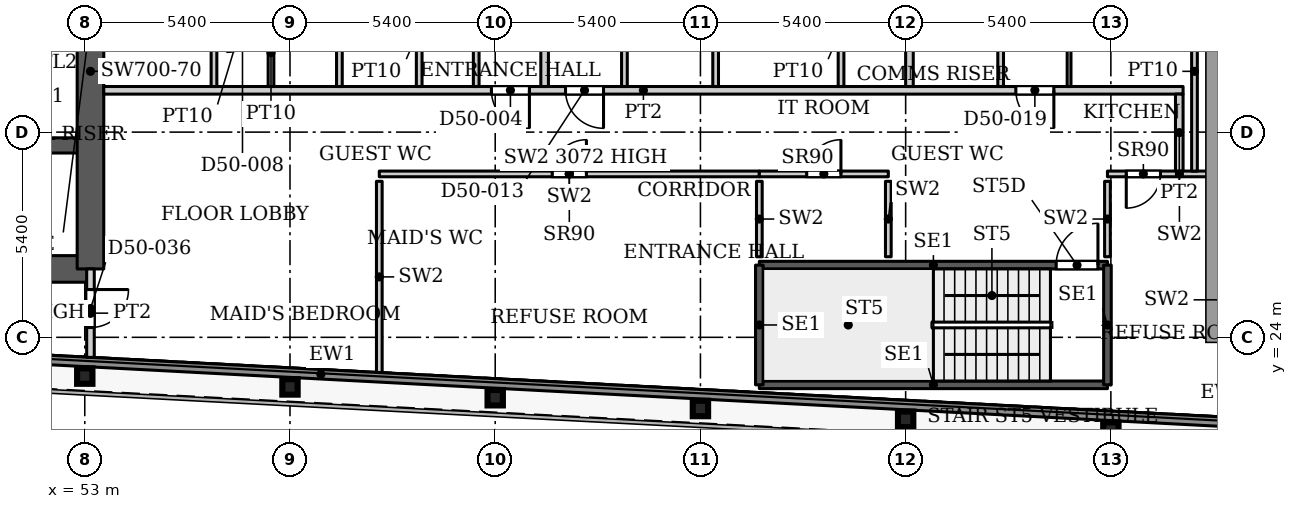
"""IFC4 building model, lengths in metres.
Left out: names, types, materials, properties, quantities, classifications, styles, units other than length and angle.
Written with IfcOpenShell. Run it as: python <this file> out.ifc"""

import sys

from ifc_helpers import new_model, si_unit, direction, frame, frame_2d, origin, origin_2d, place, context, subcontext, project, spatial, rectangle, i_section, extrude, source, transform, mapped, element, fill, save


model = new_model("IFC4")
c1 = context("Model", 3, precision=1e-05, world=origin(), true_north=direction((0.0, 1.0)))
c2 = subcontext(c1, "Body", "Model", "MODEL_VIEW")
j1 = project(units=[si_unit("LENGTHUNIT", "METRE"), si_unit("PLANEANGLEUNIT", "RADIAN")], contexts=[c1])
p1 = place(None, origin())
s1 = spatial("IfcSite", under=j1, at=p1, CompositionType="ELEMENT")
p2 = place(p1, origin())
s2 = spatial("IfcBuilding", under=s1, at=p2, CompositionType="ELEMENT")
p3 = place(p2, frame((0.0, 0.0, 216.2)))
s3 = spatial("IfcBuildingStorey", under=s2, at=p3, CompositionType="ELEMENT", Elevation=216.2)
for number, where, z_axis, x_axis in (
    (1, (80.0, 21.558, 0.0), (0.0, 0.0, 1.0), (1.0, 0.0, 0.0)),
    (2, (74.6, 21.843, 0.0), (0.0, 0.0, 1.0), (1.0, 0.0, 0.0)),
    (3, (69.2, 22.127, 0.0), (0.0, 0.0, 1.0), (1.0, 0.0, 0.0)),
    (4, (63.8, 22.411, 0.0), (0.0, 0.0, 1.0), (1.0, 0.0, 0.0)),
    (5, (58.4, 22.695, 0.0), (0.0, 0.0, 1.0), (1.0, 0.0, 0.0)),
    (6, (53.0, 22.98, 0.0), (0.0, 0.0, 1.0), (1.0, 0.0, 0.0)),
):
    element("IfcColumn", number, at=place(p3, frame(where, z_axis=z_axis, x_axis=x_axis)), inside=s3, PredefinedType="COLUMN", context=c2, shape_type="SweptSolid", body=[
        extrude(i_section(OverallWidth=0.404, OverallDepth=0.407, WebThickness=0.027, FlangeThickness=0.044, FilletRadius=0.012, at=origin_2d()), origin(), (0.0, 0.0, 1.0), 3.9),
    ])
p4 = place(p3, frame((34.75, 25.8, 0.0), z_axis=(0.0, 0.0, 1.0), x_axis=(1.0, 0.0, 0.0)))
e7 = element("IfcWall", 7, at=p4, inside=s3, PredefinedType="SHEAR", context=c2, shape_type="SweptSolid", body=[
    extrude(rectangle(XDim=18.4, YDim=0.7, at=frame_2d((9.2, 0.0))), origin(), (0.0, 0.0, 1.0), 3.9),
])
p5 = place(p3, frame((34.75, 29.05, 0.0), z_axis=(0.0, 0.0, 1.0), x_axis=(1.0, 0.0, 0.0)))
e8 = element("IfcWall", 8, at=p5, inside=s3, PredefinedType="SHEAR", context=c2, shape_type="SweptSolid", body=[
    extrude(rectangle(XDim=18.4, YDim=0.4, at=frame_2d((9.2, 0.0))), origin(), (0.0, 0.0, 1.0), 3.9),
])
p6 = place(p5, frame((0.875, 0.0, 0.0)))
e9 = element("IfcOpeningElement", 9, at=p6, cuts=e8, PredefinedType="OPENING", context=c2, shape_type="SweptSolid", body=[
    extrude(rectangle(XDim=1.1, YDim=2.2, at=frame_2d((0.55, 1.1))), frame((0.0, 0.21, 0.0), z_axis=(0.0, -1.0, 0.0), x_axis=(1.0, 0.0, 0.0)), (0.0, 0.0, 1.0), 0.42),
])
p7 = place(p5, frame((3.725, 0.0, 0.0)))
e10 = element("IfcOpeningElement", 10, at=p7, cuts=e8, PredefinedType="OPENING", context=c2, shape_type="SweptSolid", body=[
    extrude(rectangle(XDim=1.1, YDim=2.2, at=frame_2d((0.55, 1.1))), frame((0.0, 0.21, 0.0), z_axis=(0.0, -1.0, 0.0), x_axis=(1.0, 0.0, 0.0)), (0.0, 0.0, 1.0), 0.42),
])
p8 = place(p5, frame((6.575, 0.0, 0.0)))
e11 = element("IfcOpeningElement", 11, at=p8, cuts=e8, PredefinedType="OPENING", context=c2, shape_type="SweptSolid", body=[
    extrude(rectangle(XDim=1.1, YDim=2.2, at=frame_2d((0.55, 1.1))), frame((0.0, 0.21, 0.0), z_axis=(0.0, -1.0, 0.0), x_axis=(1.0, 0.0, 0.0)), (0.0, 0.0, 1.0), 0.42),
])
p9 = place(p5, frame((9.425, 0.0, 0.0)))
e12 = element("IfcOpeningElement", 12, at=p9, cuts=e8, PredefinedType="OPENING", context=c2, shape_type="SweptSolid", body=[
    extrude(rectangle(XDim=1.1, YDim=2.2, at=frame_2d((0.55, 1.1))), frame((0.0, 0.21, 0.0), z_axis=(0.0, -1.0, 0.0), x_axis=(1.0, 0.0, 0.0)), (0.0, 0.0, 1.0), 0.42),
])
p10 = place(p5, frame((12.275, 0.0, 0.0)))
e13 = element("IfcOpeningElement", 13, at=p10, cuts=e8, PredefinedType="OPENING", context=c2, shape_type="SweptSolid", body=[
    extrude(rectangle(XDim=1.1, YDim=2.2, at=frame_2d((0.55, 1.1))), frame((0.0, 0.21, 0.0), z_axis=(0.0, -1.0, 0.0), x_axis=(1.0, 0.0, 0.0)), (0.0, 0.0, 1.0), 0.42),
])
p11 = place(p5, frame((15.125, 0.0, 0.0)))
e14 = element("IfcOpeningElement", 14, at=p11, cuts=e8, PredefinedType="OPENING", context=c2, shape_type="SweptSolid", body=[
    extrude(rectangle(XDim=1.1, YDim=2.2, at=frame_2d((0.55, 1.1))), frame((0.0, 0.21, 0.0), z_axis=(0.0, -1.0, 0.0), x_axis=(1.0, 0.0, 0.0)), (0.0, 0.0, 1.0), 0.42),
])
p12 = place(p3, frame((53.15, 25.8, 0.0), z_axis=(0.0, 0.0, 1.0), x_axis=(0.0, 1.0, 0.0)))
e15 = element("IfcWall", 15, at=p12, inside=s3, PredefinedType="SHEAR", context=c2, shape_type="SweptSolid", body=[
    extrude(rectangle(XDim=10.4, YDim=0.7, at=frame_2d((5.2, 0.0))), origin(), (0.0, 0.0, 1.0), 3.9),
])
p13 = place(p3, frame((84.386, 21.703, 0.0), z_axis=(0.0, 0.0, 1.0), x_axis=(-0.998617508267, 0.05256493302, 0.0)))
e16 = element("IfcWall", 16, at=p13, inside=s3, PredefinedType="SOLIDWALL", context=c2, shape_type="SweptSolid", body=[
    extrude(rectangle(XDim=50.417, YDim=0.25, at=frame_2d((25.208, 0.0))), origin(), (0.0, 0.0, 1.0), 3.75),
])
p14 = place(p3, frame((70.75, 22.75, 0.0), z_axis=(0.0, 0.0, 1.0), x_axis=(1.0, 0.0, 0.0)))
e17 = element("IfcWall", 17, at=p14, inside=s3, PredefinedType="SHEAR", context=c2, shape_type="SweptSolid", body=[
    extrude(rectangle(XDim=9.16, YDim=0.2, at=frame_2d((4.58, 0.0))), origin(), (0.0, 0.0, 1.0), 3.9),
])
p15 = place(p3, frame((70.75, 25.9, 0.0), z_axis=(0.0, 0.0, 1.0), x_axis=(1.0, 0.0, 0.0)))
e18 = element("IfcWall", 18, at=p15, inside=s3, PredefinedType="SHEAR", context=c2, shape_type="SweptSolid", body=[
    extrude(rectangle(XDim=9.16, YDim=0.2, at=frame_2d((4.58, 0.0))), origin(), (0.0, 0.0, 1.0), 3.9),
])
p16 = place(p15, frame((7.81, 0.0, 0.0)))
e19 = element("IfcOpeningElement", 19, at=p16, cuts=e18, PredefinedType="OPENING", context=c2, shape_type="SweptSolid", body=[
    extrude(rectangle(XDim=1.1, YDim=2.2, at=frame_2d((0.55, 1.1))), frame((0.0, 0.11, 0.0), z_axis=(0.0, -1.0, 0.0), x_axis=(1.0, 0.0, 0.0)), (0.0, 0.0, 1.0), 0.22),
])
for number, where, z_axis, x_axis in (
    (20, (70.75, 22.75, 0.0), (0.0, 0.0, 1.0), (0.0, 1.0, 0.0)),
    (21, (79.91, 22.75, 0.0), (0.0, 0.0, 1.0), (0.0, 1.0, 0.0)),
):
    element("IfcWall", number, at=place(p3, frame(where, z_axis=z_axis, x_axis=x_axis)), inside=s3, PredefinedType="SHEAR", context=c2, shape_type="SweptSolid", body=[
        extrude(rectangle(XDim=3.15, YDim=0.2, at=frame_2d((1.575, 0.0))), origin(), (0.0, 0.0, 1.0), 3.9),
    ])
p17 = place(p3, frame((60.75, 28.3, 0.0), z_axis=(0.0, 0.0, 1.0), x_axis=(1.0, 0.0, 0.0)))
e22 = element("IfcWall", 22, at=p17, inside=s3, PredefinedType="PARTITIONING", context=c2, shape_type="SweptSolid", body=[
    extrude(rectangle(XDim=10.0, YDim=0.15, at=frame_2d((5.0, 0.0))), origin(), (0.0, 0.0, 1.0), 3.072),
])
p18 = place(p17, frame((4.55, 0.0, 0.0)))
e23 = element("IfcOpeningElement", 23, at=p18, cuts=e22, PredefinedType="OPENING", context=c2, shape_type="SweptSolid", body=[
    extrude(rectangle(XDim=0.9, YDim=2.2, at=frame_2d((0.45, 1.1))), frame((0.0, 0.085, 0.0), z_axis=(0.0, -1.0, 0.0), x_axis=(1.0, 0.0, 0.0)), (0.0, 0.0, 1.0), 0.17),
])
p19 = place(p3, frame((60.75, 23.075, 0.0), z_axis=(0.0, 0.0, 1.0), x_axis=(0.0, 1.0, 0.0)))
e24 = element("IfcWall", 24, at=p19, inside=s3, PredefinedType="PARTITIONING", context=c2, shape_type="SweptSolid", body=[
    extrude(rectangle(XDim=5.03, YDim=0.15, at=frame_2d((2.515, 0.0))), origin(), (0.0, 0.0, 1.0), 3.9),
])
p20 = place(p3, frame((70.75, 26.12, 0.0), z_axis=(0.0, 0.0, 1.0), x_axis=(0.0, 1.0, 0.0)))
e25 = element("IfcWall", 25, at=p20, inside=s3, PredefinedType="PARTITIONING", context=c2, shape_type="SweptSolid", body=[
    extrude(rectangle(XDim=1.985, YDim=0.15, at=frame_2d((0.992, 0.0))), origin(), (0.0, 0.0, 1.0), 3.9),
])
p21 = place(p3, frame((70.75, 28.3, 0.0), z_axis=(0.0, 0.0, 1.0), x_axis=(1.0, 0.0, 0.0)))
e26 = element("IfcWall", 26, at=p21, inside=s3, PredefinedType="PARTITIONING", context=c2, shape_type="SweptSolid", body=[
    extrude(rectangle(XDim=3.394, YDim=0.15, at=frame_2d((1.697, 0.0))), origin(), (0.0, 0.0, 1.0), 3.9),
])
p22 = place(p21, frame((1.247, 0.0, 0.0)))
e27 = element("IfcOpeningElement", 27, at=p22, cuts=e26, PredefinedType="OPENING", context=c2, shape_type="SweptSolid", body=[
    extrude(rectangle(XDim=0.9, YDim=2.2, at=frame_2d((0.45, 1.1))), frame((0.0, 0.085, 0.0), z_axis=(0.0, -1.0, 0.0), x_axis=(1.0, 0.0, 0.0)), (0.0, 0.0, 1.0), 0.17),
])
p23 = place(p3, frame((74.144, 26.12, 0.0), z_axis=(0.0, 0.0, 1.0), x_axis=(0.0, 1.0, 0.0)))
e28 = element("IfcWall", 28, at=p23, inside=s3, PredefinedType="PARTITIONING", context=c2, shape_type="SweptSolid", body=[
    extrude(rectangle(XDim=1.985, YDim=0.15, at=frame_2d((0.992, 0.0))), origin(), (0.0, 0.0, 1.0), 3.9),
])
p24 = place(p3, frame((79.91, 28.3, 0.0), z_axis=(0.0, 0.0, 1.0), x_axis=(1.0, 0.0, 0.0)))
e29 = element("IfcWall", 29, at=p24, inside=s3, PredefinedType="PARTITIONING", context=c2, shape_type="SweptSolid", body=[
    extrude(rectangle(XDim=3.788, YDim=0.15, at=frame_2d((1.894, 0.0))), origin(), (0.0, 0.0, 1.0), 3.9),
])
p25 = place(p24, frame((0.495, 0.0, 0.0)))
e30 = element("IfcOpeningElement", 30, at=p25, cuts=e29, PredefinedType="OPENING", context=c2, shape_type="SweptSolid", body=[
    extrude(rectangle(XDim=0.9, YDim=2.2, at=frame_2d((0.45, 1.1))), frame((0.0, 0.085, 0.0), z_axis=(0.0, -1.0, 0.0), x_axis=(1.0, 0.0, 0.0)), (0.0, 0.0, 1.0), 0.17),
])
p26 = place(p3, frame((79.91, 26.12, 0.0), z_axis=(0.0, 0.0, 1.0), x_axis=(0.0, 1.0, 0.0)))
e31 = element("IfcWall", 31, at=p26, inside=s3, PredefinedType="PARTITIONING", context=c2, shape_type="SweptSolid", body=[
    extrude(rectangle(XDim=1.985, YDim=0.15, at=frame_2d((0.992, 0.0))), origin(), (0.0, 0.0, 1.0), 3.9),
])
p27 = place(p3, frame((53.15, 23.472, 0.0), z_axis=(0.0, 0.0, 1.0), x_axis=(0.0, 1.0, 0.0)))
e32 = element("IfcWall", 32, at=p27, inside=s3, PredefinedType="PARTITIONING", context=c2, shape_type="SweptSolid", body=[
    extrude(rectangle(XDim=2.328, YDim=0.2, at=frame_2d((1.164, 0.0))), origin(), (0.0, 0.0, 1.0), 3.447),
])
p28 = place(p27, frame((0.785, 0.0, 0.0)))
e33 = element("IfcOpeningElement", 33, at=p28, cuts=e32, PredefinedType="OPENING", context=c2, shape_type="SweptSolid", body=[
    extrude(rectangle(XDim=1.0, YDim=2.1, at=frame_2d((0.5, 1.05))), frame((0.0, 0.11, 0.0), z_axis=(0.0, -1.0, 0.0), x_axis=(1.0, 0.0, 0.0)), (0.0, 0.0, 1.0), 0.22),
])
p29 = place(p3, frame((53.499, 30.5, 0.0), z_axis=(0.0, 0.0, 1.0), x_axis=(1.0, 0.0, 0.0)))
e34 = element("IfcWall", 34, at=p29, inside=s3, PredefinedType="PARTITIONING", context=c2, shape_type="SweptSolid", body=[
    extrude(rectangle(XDim=28.401, YDim=0.2, at=frame_2d((14.2, 0.0))), origin(), (0.0, 0.0, 1.0), 3.6),
])
p30 = place(p29, frame((10.201, 0.0, 0.0)))
e35 = element("IfcOpeningElement", 35, at=p30, cuts=e34, PredefinedType="OPENING", context=c2, shape_type="SweptSolid", body=[
    extrude(rectangle(XDim=1.0, YDim=2.1, at=frame_2d((0.5, 1.05))), frame((0.0, 0.11, 0.0), z_axis=(0.0, -1.0, 0.0), x_axis=(1.0, 0.0, 0.0)), (0.0, 0.0, 1.0), 0.22),
])
p31 = place(p29, frame((12.151, 0.0, 0.0)))
e36 = element("IfcOpeningElement", 36, at=p31, cuts=e34, PredefinedType="OPENING", context=c2, shape_type="SweptSolid", body=[
    extrude(rectangle(XDim=1.0, YDim=2.1, at=frame_2d((0.5, 1.05))), frame((0.0, 0.11, 0.0), z_axis=(0.0, -1.0, 0.0), x_axis=(1.0, 0.0, 0.0)), (0.0, 0.0, 1.0), 0.22),
])
p32 = place(p29, frame((24.001, 0.0, 0.0)))
e37 = element("IfcOpeningElement", 37, at=p32, cuts=e34, PredefinedType="OPENING", context=c2, shape_type="SweptSolid", body=[
    extrude(rectangle(XDim=1.0, YDim=2.1, at=frame_2d((0.5, 1.05))), frame((0.0, 0.11, 0.0), z_axis=(0.0, -1.0, 0.0), x_axis=(1.0, 0.0, 0.0)), (0.0, 0.0, 1.0), 0.22),
])
p33 = place(p3, frame((56.4, 30.6, 0.0), z_axis=(0.0, 0.0, 1.0), x_axis=(0.0, 1.0, 0.0)))
e38 = element("IfcWall", 38, at=p33, inside=s3, PredefinedType="PARTITIONING", context=c2, shape_type="SweptSolid", body=[
    extrude(rectangle(XDim=3.025, YDim=0.15, at=frame_2d((1.512, 0.0))), origin(), (0.0, 0.0, 1.0), 3.6),
])
p34 = place(p3, frame((57.9, 30.6, 0.0), z_axis=(0.0, 0.0, 1.0), x_axis=(0.0, 1.0, 0.0)))
e39 = element("IfcWall", 39, at=p34, inside=s3, PredefinedType="PARTITIONING", context=c2, shape_type="SweptSolid", body=[
    extrude(rectangle(XDim=1.775, YDim=0.15, at=frame_2d((0.887, 0.0))), origin(), (0.0, 0.0, 1.0), 3.6),
])
for number, where, z_axis, x_axis in (
    (40, (59.7, 30.6, 0.0), (0.0, 0.0, 1.0), (0.0, 1.0, 0.0)),
    (41, (61.8, 30.6, 0.0), (0.0, 0.0, 1.0), (0.0, 1.0, 0.0)),
    (42, (63.3, 30.6, 0.0), (0.0, 0.0, 1.0), (0.0, 1.0, 0.0)),
):
    element("IfcWall", number, at=place(p3, frame(where, z_axis=z_axis, x_axis=x_axis)), inside=s3, PredefinedType="PARTITIONING", context=c2, shape_type="SweptSolid", body=[
        extrude(rectangle(XDim=3.025, YDim=0.15, at=frame_2d((1.512, 0.0))), origin(), (0.0, 0.0, 1.0), 3.6),
    ])
p35 = place(p3, frame((65.1, 30.6, 0.0), z_axis=(0.0, 0.0, 1.0), x_axis=(0.0, 1.0, 0.0)))
e43 = element("IfcWall", 43, at=p35, inside=s3, PredefinedType="PARTITIONING", context=c2, shape_type="SweptSolid", body=[
    extrude(rectangle(XDim=13.3, YDim=0.2, at=frame_2d((6.65, 0.0))), origin(), (0.0, 0.0, 1.0), 3.6),
])
for number, where, z_axis, x_axis in (
    (44, (67.2, 30.6, 0.0), (0.0, 0.0, 1.0), (0.0, 1.0, 0.0)),
    (45, (69.6, 30.6, 0.0), (0.0, 0.0, 1.0), (0.0, 1.0, 0.0)),
    (46, (72.9, 30.6, 0.0), (0.0, 0.0, 1.0), (0.0, 1.0, 0.0)),
):
    element("IfcWall", number, at=place(p3, frame(where, z_axis=z_axis, x_axis=x_axis)), inside=s3, PredefinedType="PARTITIONING", context=c2, shape_type="SweptSolid", body=[
        extrude(rectangle(XDim=3.025, YDim=0.15, at=frame_2d((1.512, 0.0))), origin(), (0.0, 0.0, 1.0), 3.6),
    ])
p36 = place(p3, frame((74.7, 30.6, 0.0), z_axis=(0.0, 0.0, 1.0), x_axis=(0.0, 1.0, 0.0)))
e47 = element("IfcWall", 47, at=p36, inside=s3, PredefinedType="PARTITIONING", context=c2, shape_type="SweptSolid", body=[
    extrude(rectangle(XDim=13.3, YDim=0.2, at=frame_2d((6.65, 0.0))), origin(), (0.0, 0.0, 1.0), 3.6),
])
p37 = place(p3, frame((77.1, 30.6, 0.0), z_axis=(0.0, 0.0, 1.0), x_axis=(0.0, 1.0, 0.0)))
e48 = element("IfcWall", 48, at=p37, inside=s3, PredefinedType="PARTITIONING", context=c2, shape_type="SweptSolid", body=[
    extrude(rectangle(XDim=3.175, YDim=0.15, at=frame_2d((1.587, 0.0))), origin(), (0.0, 0.0, 1.0), 3.6),
])
p38 = place(p3, frame((78.9, 30.6, 0.0), z_axis=(0.0, 0.0, 1.0), x_axis=(0.0, 1.0, 0.0)))
e49 = element("IfcWall", 49, at=p38, inside=s3, PredefinedType="PARTITIONING", context=c2, shape_type="SweptSolid", body=[
    extrude(rectangle(XDim=3.025, YDim=0.1, at=frame_2d((1.512, 0.0))), origin(), (0.0, 0.0, 1.0), 3.6),
])
p39 = place(p3, frame((81.8, 28.374, 0.0), z_axis=(0.0, 0.0, 1.0), x_axis=(0.0, 1.0, 0.0)))
e50 = element("IfcWall", 50, at=p39, inside=s3, PredefinedType="PARTITIONING", context=c2, shape_type="SweptSolid", body=[
    extrude(rectangle(XDim=2.026, YDim=0.2, at=frame_2d((1.013, 0.0))), origin(), (0.0, 0.0, 1.0), 3.6),
])
p40 = place(p3, frame((82.2, 28.374, 0.0), z_axis=(0.0, 0.0, 1.0), x_axis=(0.0, 1.0, 0.0)))
e51 = element("IfcWall", 51, at=p40, inside=s3, PredefinedType="PARTITIONING", context=c2, shape_type="SweptSolid", body=[
    extrude(rectangle(XDim=5.251, YDim=0.15, at=frame_2d((2.625, 0.0))), origin(), (0.0, 0.0, 1.0), 3.6),
])
m1 = source(origin(), c2, "Body", "SweptSolid", [
    extrude(rectangle(XDim=0.9, YDim=2.2, at=frame_2d((0.45, 1.1))), frame((0.0, 0.025, 0.0), z_axis=(0.0, -1.0, 0.0), x_axis=(1.0, 0.0, 0.0)), (0.0, 0.0, 1.0), 0.05),
])
p41 = place(p18, origin())
e52 = element("IfcDoor", 52, at=p41, inside=s3, OperationType="SINGLE_SWING_LEFT", PredefinedType="DOOR", context=c2, shape_type="MappedRepresentation", body=[
    mapped(m1, transform((0.0, 0.0, 0.0), x_axis=(1.0, 0.0, 0.0), y_axis=(0.0, 1.0, 0.0), z_axis=(0.0, 0.0, 1.0), scale=1.0)),
])
fill(e23, e52)
p42 = place(p22, origin())
e53 = element("IfcDoor", 53, at=p42, inside=s3, OperationType="SINGLE_SWING_LEFT", PredefinedType="DOOR", context=c2, shape_type="MappedRepresentation", body=[
    mapped(m1, transform((0.0, 0.0, 0.0), x_axis=(1.0, 0.0, 0.0), y_axis=(0.0, 1.0, 0.0), z_axis=(0.0, 0.0, 1.0), scale=1.0)),
])
fill(e27, e53)
p43 = place(p25, origin())
e54 = element("IfcDoor", 54, at=p43, inside=s3, OperationType="SINGLE_SWING_RIGHT", PredefinedType="DOOR", context=c2, shape_type="MappedRepresentation", body=[
    mapped(m1, transform((0.0, 0.0, 0.0), x_axis=(1.0, 0.0, 0.0), y_axis=(0.0, 1.0, 0.0), z_axis=(0.0, 0.0, 1.0), scale=1.0)),
])
fill(e30, e54)
m2 = source(origin(), c2, "Body", "SweptSolid", [
    extrude(rectangle(XDim=1.1, YDim=2.2, at=frame_2d((0.55, 1.1))), frame((0.0, 0.025, 0.0), z_axis=(0.0, -1.0, 0.0), x_axis=(1.0, 0.0, 0.0)), (0.0, 0.0, 1.0), 0.05),
])
p44 = place(p16, origin())
e55 = element("IfcDoor", 55, at=p44, inside=s3, OperationType="SINGLE_SWING_LEFT", PredefinedType="DOOR", context=c2, shape_type="MappedRepresentation", body=[
    mapped(m2, transform((0.0, 0.0, 0.0), x_axis=(1.0, 0.0, 0.0), y_axis=(0.0, 1.0, 0.0), z_axis=(0.0, 0.0, 1.0), scale=1.0)),
])
fill(e19, e55)
m3 = source(origin(), c2, "Body", "SweptSolid", [
    extrude(rectangle(XDim=1.0, YDim=2.1, at=frame_2d((0.5, 1.05))), frame((0.0, 0.025, 0.0), z_axis=(0.0, -1.0, 0.0), x_axis=(1.0, 0.0, 0.0)), (0.0, 0.0, 1.0), 0.05),
])
p45 = place(p30, origin())
e56 = element("IfcDoor", 56, at=p45, inside=s3, OperationType="SINGLE_SWING_RIGHT", PredefinedType="DOOR", context=c2, shape_type="MappedRepresentation", body=[
    mapped(m3, transform((0.0, 0.0, 0.0), x_axis=(1.0, 0.0, 0.0), y_axis=(0.0, 1.0, 0.0), z_axis=(0.0, 0.0, 1.0), scale=1.0)),
])
fill(e35, e56)
p46 = place(p31, origin())
e57 = element("IfcDoor", 57, at=p46, inside=s3, OperationType="SINGLE_SWING_RIGHT", PredefinedType="DOOR", context=c2, shape_type="MappedRepresentation", body=[
    mapped(m3, transform((0.0, 0.0, 0.0), x_axis=(1.0, 0.0, 0.0), y_axis=(0.0, 1.0, 0.0), z_axis=(0.0, 0.0, 1.0), scale=1.0)),
])
fill(e36, e57)
p47 = place(p32, origin())
e58 = element("IfcDoor", 58, at=p47, inside=s3, OperationType="SINGLE_SWING_RIGHT", PredefinedType="DOOR", context=c2, shape_type="MappedRepresentation", body=[
    mapped(m3, transform((0.0, 0.0, 0.0), x_axis=(1.0, 0.0, 0.0), y_axis=(0.0, 1.0, 0.0), z_axis=(0.0, 0.0, 1.0), scale=1.0)),
])
fill(e37, e58)
m4 = source(origin(), c2, "Body", "SweptSolid", [
    extrude(rectangle(XDim=1.0, YDim=2.1, at=frame_2d((0.5, 1.05))), frame((0.0, 0.025, 0.0), z_axis=(0.0, -1.0, 0.0), x_axis=(1.0, 0.0, 0.0)), (0.0, 0.0, 1.0), 0.05),
])
p48 = place(p28, origin())
e59 = element("IfcDoor", 59, at=p48, inside=s3, OperationType="SINGLE_SWING_RIGHT", PredefinedType="DOOR", context=c2, shape_type="MappedRepresentation", body=[
    mapped(m4, transform((0.0, 0.0, 0.0), x_axis=(1.0, 0.0, 0.0), y_axis=(0.0, 1.0, 0.0), z_axis=(0.0, 0.0, 1.0), scale=1.0)),
])
fill(e33, e59)
save(model, sys.argv[1])
